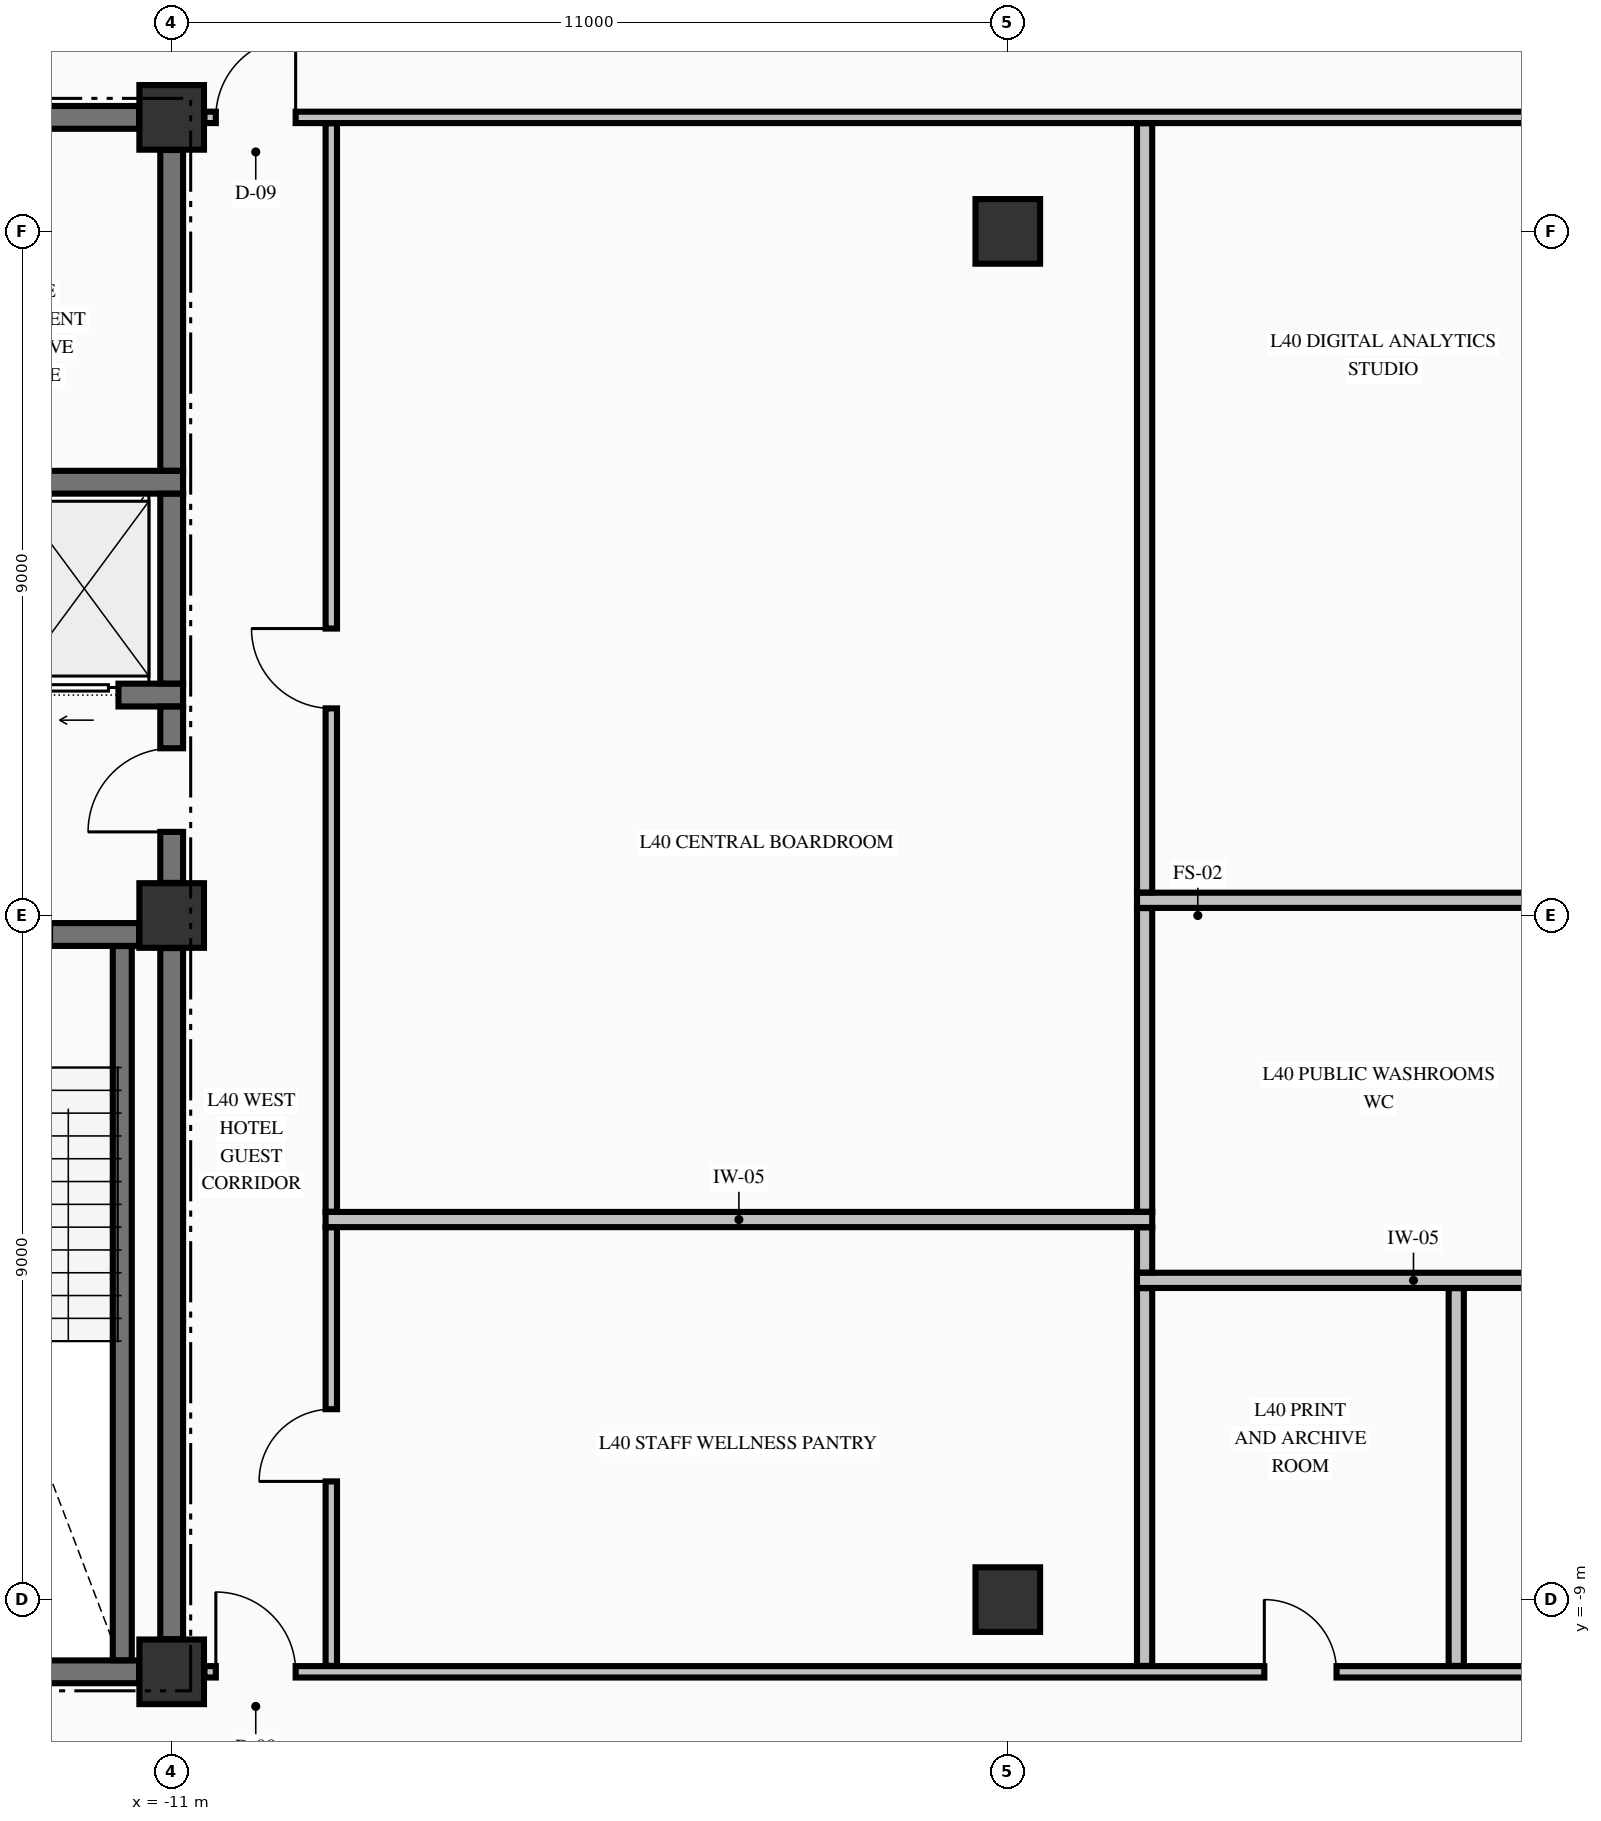
"""IFC4 building model, lengths in metres.
Left out: names, types, materials, properties, quantities, classifications, styles, units other than length and angle.
Written with IfcOpenShell. Run it as: python <this file> out.ifc"""

import sys

from ifc_helpers import new_model, si_unit, direction, frame, frame_2d, origin, origin_2d, place, context, subcontext, project, spatial, rectangle, extrude, element, fill, save


model = new_model("IFC4")
c1 = context("Model", 3, precision=1e-05, world=origin(), true_north=direction((0.0, 1.0)))
c2 = subcontext(c1, "Body", "Model", "MODEL_VIEW")
j1 = project(units=[si_unit("LENGTHUNIT", "METRE"), si_unit("PLANEANGLEUNIT", "RADIAN")], contexts=[c1])
p1 = place(None, origin())
s1 = spatial("IfcSite", under=j1, at=p1, CompositionType="ELEMENT")
p2 = place(p1, origin())
s2 = spatial("IfcBuilding", under=s1, at=p2, CompositionType="ELEMENT")
p3 = place(p2, frame((0.0, 0.0, 158.24)))
s3 = spatial("IfcBuildingStorey", under=s2, at=p3, CompositionType="ELEMENT", Elevation=158.24)
for number, where, z_axis, x_axis in (
    (1, (-11.0, -9.95, -0.425), (0.0, 0.0, 1.0), (1.0, 0.0, 0.0)),
    (2, (-11.0, 0.0, -0.425), (0.0, 0.0, 1.0), (1.0, 0.0, 0.0)),
    (3, (-11.0, 10.5, -0.425), (0.0, 0.0, 1.0), (1.0, 0.0, 0.0)),
    (4, (0.0, -9.0, -0.425), (0.0, 0.0, 1.0), (1.0, 0.0, 0.0)),
    (5, (0.0, 9.0, -0.425), (0.0, 0.0, 1.0), (1.0, 0.0, 0.0)),
):
    element("IfcColumn", number, at=place(p3, frame(where, z_axis=z_axis, x_axis=x_axis)), inside=s3, PredefinedType="COLUMN", context=c2, shape_type="SweptSolid", body=[
        extrude(rectangle(XDim=0.85, YDim=0.85, at=origin_2d()), origin(), (0.0, 0.0, 1.0), 4.595),
    ])
p4 = place(p3, frame((-14.7, -9.95, 0.0), z_axis=(0.0, 0.0, 1.0), x_axis=(1.0, 0.0, 0.0)))
e6 = element("IfcWall", 6, at=p4, inside=s3, PredefinedType="SHEAR", context=c2, shape_type="SweptSolid", body=[
    extrude(rectangle(XDim=3.271, YDim=0.3, at=frame_2d((1.635, 0.0))), origin(), (0.0, 0.0, 1.0), 4.17),
])
p5 = place(p3, frame((-19.571, -0.25, 0.0), z_axis=(0.0, 0.0, 1.0), x_axis=(1.0, 0.0, 0.0)))
e7 = element("IfcWall", 7, at=p5, inside=s3, PredefinedType="SHEAR", context=c2, shape_type="SweptSolid", body=[
    extrude(rectangle(XDim=8.142, YDim=0.3, at=frame_2d((4.071, 0.0))), origin(), (0.0, 0.0, 1.0), 4.17),
])
p6 = place(p5, frame((5.871, 0.0, 0.0)))
e8 = element("IfcOpeningElement", 8, at=p6, cuts=e7, PredefinedType="OPENING", context=c2, shape_type="SweptSolid", body=[
    extrude(rectangle(XDim=1.1, YDim=2.15, at=frame_2d((0.55, 1.075))), frame((0.0, 0.16, 0.0), z_axis=(0.0, -1.0, 0.0), x_axis=(1.0, 0.0, 0.0)), (0.0, 0.0, 1.0), 0.32),
])
p7 = place(p3, frame((-14.875, 2.9, 0.0), z_axis=(0.0, 0.0, 1.0), x_axis=(1.0, 0.0, 0.0)))
e9 = element("IfcWall", 9, at=p7, inside=s3, PredefinedType="SHEAR", context=c2, shape_type="SweptSolid", body=[
    extrude(rectangle(XDim=4.025, YDim=0.3, at=frame_2d((2.012, 0.0))), origin(), (0.0, 0.0, 1.0), 4.17),
])
p8 = place(p7, frame((2.075, 0.0, 0.0)))
e10 = element("IfcOpeningElement", 10, at=p8, cuts=e9, PredefinedType="OPENING", context=c2, shape_type="SweptSolid", body=[
    extrude(rectangle(XDim=1.1, YDim=2.2, at=frame_2d((0.55, 1.1))), frame((0.0, 0.16, 0.0), z_axis=(0.0, -1.0, 0.0), x_axis=(1.0, 0.0, 0.0)), (0.0, 0.0, 1.0), 0.32),
])
p9 = place(p3, frame((-14.875, 5.7, 0.0), z_axis=(0.0, 0.0, 1.0), x_axis=(1.0, 0.0, 0.0)))
e11 = element("IfcWall", 11, at=p9, inside=s3, PredefinedType="SHEAR", context=c2, shape_type="SweptSolid", body=[
    extrude(rectangle(XDim=4.025, YDim=0.3, at=frame_2d((2.012, 0.0))), origin(), (0.0, 0.0, 1.0), 4.17),
])
p10 = place(p3, frame((-14.7, 10.5, 0.0), z_axis=(0.0, 0.0, 1.0), x_axis=(1.0, 0.0, 0.0)))
e12 = element("IfcWall", 12, at=p10, inside=s3, PredefinedType="SHEAR", context=c2, shape_type="SweptSolid", body=[
    extrude(rectangle(XDim=3.271, YDim=0.3, at=frame_2d((1.635, 0.0))), origin(), (0.0, 0.0, 1.0), 4.17),
])
p11 = place(p10, frame((0.775, 0.0, 0.0)))
e13 = element("IfcOpeningElement", 13, at=p11, cuts=e12, PredefinedType="OPENING", context=c2, shape_type="SweptSolid", body=[
    extrude(rectangle(XDim=0.95, YDim=2.15, at=frame_2d((0.475, 1.075))), frame((0.0, 0.16, 0.0), z_axis=(0.0, -1.0, 0.0), x_axis=(1.0, 0.0, 0.0)), (0.0, 0.0, 1.0), 0.32),
])
p12 = place(p3, frame((-10.569, -9.95, 0.0), z_axis=(0.0, 0.0, 1.0), x_axis=(1.0, 0.0, 0.0)))
e14 = element("IfcWall", 14, at=p12, inside=s3, PredefinedType="PARTITIONING", context=c2, shape_type="SweptSolid", body=[
    extrude(rectangle(XDim=21.138, YDim=0.15, at=frame_2d((10.569, 0.0))), origin(), (0.0, 0.0, 1.0), 4.17),
])
p13 = place(p12, frame((0.15, 0.0, 0.0)))
e15 = element("IfcOpeningElement", 15, at=p13, cuts=e14, PredefinedType="OPENING", context=c2, shape_type="SweptSolid", body=[
    extrude(rectangle(XDim=1.05, YDim=2.15, at=frame_2d((0.525, 1.075))), frame((0.0, 0.085, 0.0), z_axis=(0.0, -1.0, 0.0), x_axis=(1.0, 0.0, 0.0)), (0.0, 0.0, 1.0), 0.17),
])
p14 = place(p12, frame((19.938, 0.0, 0.0)))
e16 = element("IfcOpeningElement", 16, at=p14, cuts=e14, PredefinedType="OPENING", context=c2, shape_type="SweptSolid", body=[
    extrude(rectangle(XDim=1.05, YDim=2.15, at=frame_2d((0.525, 1.075))), frame((0.0, 0.085, 0.0), z_axis=(0.0, -1.0, 0.0), x_axis=(1.0, 0.0, 0.0)), (0.0, 0.0, 1.0), 0.17),
])
p15 = place(p12, frame((13.944, 0.0, 0.0)))
e17 = element("IfcOpeningElement", 17, at=p15, cuts=e14, PredefinedType="OPENING", context=c2, shape_type="SweptSolid", body=[
    extrude(rectangle(XDim=0.95, YDim=2.15, at=frame_2d((0.475, 1.075))), frame((0.0, 0.085, 0.0), z_axis=(0.0, -1.0, 0.0), x_axis=(1.0, 0.0, 0.0)), (0.0, 0.0, 1.0), 0.17),
])
p16 = place(p3, frame((1.7, -4.8, 0.0), z_axis=(0.0, 0.0, 1.0), x_axis=(1.0, 0.0, 0.0)))
e18 = element("IfcWall", 18, at=p16, inside=s3, PredefinedType="PARTITIONING", context=c2, shape_type="SweptSolid", body=[
    extrude(rectangle(XDim=7.275, YDim=0.2, at=frame_2d((3.638, 0.0))), origin(), (0.0, 0.0, 1.0), 4.17),
])
p17 = place(p3, frame((-8.975, -4.0, 0.0), z_axis=(0.0, 0.0, 1.0), x_axis=(1.0, 0.0, 0.0)))
e19 = element("IfcWall", 19, at=p17, inside=s3, PredefinedType="PARTITIONING", context=c2, shape_type="SweptSolid", body=[
    extrude(rectangle(XDim=10.875, YDim=0.2, at=frame_2d((5.438, 0.0))), origin(), (0.0, 0.0, 1.0), 4.17),
])
p18 = place(p3, frame((1.7, 0.2, 0.0), z_axis=(0.0, 0.0, 1.0), x_axis=(1.0, 0.0, 0.0)))
e20 = element("IfcWall", 20, at=p18, inside=s3, PredefinedType="PARTITIONING", context=c2, shape_type="SweptSolid", body=[
    extrude(rectangle(XDim=7.275, YDim=0.2, at=frame_2d((3.638, 0.0))), origin(), (0.0, 0.0, 1.0), 4.17),
])
p19 = place(p3, frame((-10.569, 10.5, 0.0), z_axis=(0.0, 0.0, 1.0), x_axis=(1.0, 0.0, 0.0)))
e21 = element("IfcWall", 21, at=p19, inside=s3, PredefinedType="PARTITIONING", context=c2, shape_type="SweptSolid", body=[
    extrude(rectangle(XDim=21.138, YDim=0.15, at=frame_2d((10.569, 0.0))), origin(), (0.0, 0.0, 1.0), 4.17),
])
p20 = place(p19, frame((0.15, 0.0, 0.0)))
e22 = element("IfcOpeningElement", 22, at=p20, cuts=e21, PredefinedType="OPENING", context=c2, shape_type="SweptSolid", body=[
    extrude(rectangle(XDim=1.05, YDim=2.15, at=frame_2d((0.525, 1.075))), frame((0.0, 0.085, 0.0), z_axis=(0.0, -1.0, 0.0), x_axis=(1.0, 0.0, 0.0)), (0.0, 0.0, 1.0), 0.17),
])
p21 = place(p19, frame((19.938, 0.0, 0.0)))
e23 = element("IfcOpeningElement", 23, at=p21, cuts=e21, PredefinedType="OPENING", context=c2, shape_type="SweptSolid", body=[
    extrude(rectangle(XDim=1.05, YDim=2.15, at=frame_2d((0.525, 1.075))), frame((0.0, 0.085, 0.0), z_axis=(0.0, -1.0, 0.0), x_axis=(1.0, 0.0, 0.0)), (0.0, 0.0, 1.0), 0.17),
])
p22 = place(p3, frame((-11.65, -9.798, 0.0), z_axis=(0.0, 0.0, 1.0), x_axis=(0.0, 1.0, 0.0)))
e24 = element("IfcWall", 24, at=p22, inside=s3, PredefinedType="SOLIDWALL", context=c2, shape_type="SweptSolid", body=[
    extrude(rectangle(XDim=9.396, YDim=0.25, at=frame_2d((4.698, 0.0))), origin(), (0.0, 0.0, 1.0), 4.17),
])
p23 = place(p3, frame((-11.0, -9.521, 0.0), z_axis=(0.0, 0.0, 1.0), x_axis=(0.0, 1.0, 0.0)))
e25 = element("IfcWall", 25, at=p23, inside=s3, PredefinedType="SHEAR", context=c2, shape_type="SweptSolid", body=[
    extrude(rectangle(XDim=9.092, YDim=0.3, at=frame_2d((4.546, 0.0))), origin(), (0.0, 0.0, 1.0), 4.17),
])
p24 = place(p3, frame((-11.0, 0.429, 0.0), z_axis=(0.0, 0.0, 1.0), x_axis=(0.0, 1.0, 0.0)))
e26 = element("IfcWall", 26, at=p24, inside=s3, PredefinedType="SHEAR", context=c2, shape_type="SweptSolid", body=[
    extrude(rectangle(XDim=2.319, YDim=0.3, at=frame_2d((1.16, 0.0))), origin(), (0.0, 0.0, 1.0), 4.17),
])
p25 = place(p24, frame((0.671, 0.0, 0.0)))
e27 = element("IfcOpeningElement", 27, at=p25, cuts=e26, PredefinedType="OPENING", context=c2, shape_type="SweptSolid", body=[
    extrude(rectangle(XDim=1.1, YDim=2.15, at=frame_2d((0.55, 1.075))), frame((0.0, 0.16, 0.0), z_axis=(0.0, -1.0, 0.0), x_axis=(1.0, 0.0, 0.0)), (0.0, 0.0, 1.0), 0.32),
])
p26 = place(p3, frame((-11.0, 3.052, 0.0), z_axis=(0.0, 0.0, 1.0), x_axis=(0.0, 1.0, 0.0)))
e28 = element("IfcWall", 28, at=p26, inside=s3, PredefinedType="SHEAR", context=c2, shape_type="SweptSolid", body=[
    extrude(rectangle(XDim=2.496, YDim=0.3, at=frame_2d((1.248, 0.0))), origin(), (0.0, 0.0, 1.0), 4.17),
])
p27 = place(p3, frame((-11.0, 5.852, 0.0), z_axis=(0.0, 0.0, 1.0), x_axis=(0.0, 1.0, 0.0)))
e29 = element("IfcWall", 29, at=p27, inside=s3, PredefinedType="SHEAR", context=c2, shape_type="SweptSolid", body=[
    extrude(rectangle(XDim=4.219, YDim=0.3, at=frame_2d((2.109, 0.0))), origin(), (0.0, 0.0, 1.0), 4.17),
])
p28 = place(p3, frame((-8.9, -9.872, 0.0), z_axis=(0.0, 0.0, 1.0), x_axis=(0.0, 1.0, 0.0)))
e30 = element("IfcWall", 30, at=p28, inside=s3, PredefinedType="PARTITIONING", context=c2, shape_type="SweptSolid", body=[
    extrude(rectangle(XDim=5.769, YDim=0.15, at=frame_2d((2.885, 0.0))), origin(), (0.0, 0.0, 1.0), 4.17),
])
p29 = place(p28, frame((2.427, 0.0, 0.0)))
e31 = element("IfcOpeningElement", 31, at=p29, cuts=e30, PredefinedType="OPENING", context=c2, shape_type="SweptSolid", body=[
    extrude(rectangle(XDim=0.95, YDim=2.15, at=frame_2d((0.475, 1.075))), frame((0.0, 0.085, 0.0), z_axis=(0.0, -1.0, 0.0), x_axis=(1.0, 0.0, 0.0)), (0.0, 0.0, 1.0), 0.17),
])
p30 = place(p3, frame((-8.9, -3.897, 0.0), z_axis=(0.0, 0.0, 1.0), x_axis=(0.0, 1.0, 0.0)))
e32 = element("IfcWall", 32, at=p30, inside=s3, PredefinedType="PARTITIONING", context=c2, shape_type="SweptSolid", body=[
    extrude(rectangle(XDim=14.319, YDim=0.15, at=frame_2d((7.16, 0.0))), origin(), (0.0, 0.0, 1.0), 4.17),
])
p31 = place(p30, frame((6.622, 0.0, 0.0)))
e33 = element("IfcOpeningElement", 33, at=p31, cuts=e32, PredefinedType="OPENING", context=c2, shape_type="SweptSolid", body=[
    extrude(rectangle(XDim=1.05, YDim=2.15, at=frame_2d((0.525, 1.075))), frame((0.0, 0.085, 0.0), z_axis=(0.0, -1.0, 0.0), x_axis=(1.0, 0.0, 0.0)), (0.0, 0.0, 1.0), 0.17),
])
p32 = place(p3, frame((1.8, -9.872, 0.0), z_axis=(0.0, 0.0, 1.0), x_axis=(0.0, 1.0, 0.0)))
e34 = element("IfcWall", 34, at=p32, inside=s3, PredefinedType="PARTITIONING", context=c2, shape_type="SweptSolid", body=[
    extrude(rectangle(XDim=4.969, YDim=0.2, at=frame_2d((2.484, 0.0))), origin(), (0.0, 0.0, 1.0), 4.17),
])
p33 = place(p3, frame((1.8, -4.697, 0.0), z_axis=(0.0, 0.0, 1.0), x_axis=(0.0, 1.0, 0.0)))
e35 = element("IfcWall", 35, at=p33, inside=s3, PredefinedType="PARTITIONING", context=c2, shape_type="SweptSolid", body=[
    extrude(rectangle(XDim=0.594, YDim=0.2, at=frame_2d((0.297, 0.0))), origin(), (0.0, 0.0, 1.0), 4.17),
])
p34 = place(p3, frame((1.8, -3.897, 0.0), z_axis=(0.0, 0.0, 1.0), x_axis=(0.0, 1.0, 0.0)))
e36 = element("IfcWall", 36, at=p34, inside=s3, PredefinedType="PARTITIONING", context=c2, shape_type="SweptSolid", body=[
    extrude(rectangle(XDim=3.994, YDim=0.2, at=frame_2d((1.997, 0.0))), origin(), (0.0, 0.0, 1.0), 4.17),
])
p35 = place(p3, frame((1.8, 0.303, 0.0), z_axis=(0.0, 0.0, 1.0), x_axis=(0.0, 1.0, 0.0)))
e37 = element("IfcWall", 37, at=p35, inside=s3, PredefinedType="PARTITIONING", context=c2, shape_type="SweptSolid", body=[
    extrude(rectangle(XDim=10.119, YDim=0.2, at=frame_2d((5.06, 0.0))), origin(), (0.0, 0.0, 1.0), 4.17),
])
p36 = place(p3, frame((5.9, -9.872, 0.0), z_axis=(0.0, 0.0, 1.0), x_axis=(0.0, 1.0, 0.0)))
e38 = element("IfcWall", 38, at=p36, inside=s3, PredefinedType="PARTITIONING", context=c2, shape_type="SweptSolid", body=[
    extrude(rectangle(XDim=4.969, YDim=0.2, at=frame_2d((2.484, 0.0))), origin(), (0.0, 0.0, 1.0), 4.17),
])
p37 = place(p25, origin())
e39 = element("IfcDoor", 39, at=p37, inside=s3, OperationType="SINGLE_SWING_LEFT", PredefinedType="DOOR", context=c2, shape_type="SweptSolid", body=[
    extrude(rectangle(XDim=1.1, YDim=2.15, at=frame_2d((0.55, 1.075))), frame((0.0, 0.025, 0.0), z_axis=(0.0, -1.0, 0.0), x_axis=(1.0, 0.0, 0.0)), (0.0, 0.0, 1.0), 0.05),
])
fill(e27, e39)
p38 = place(p8, origin())
e40 = element("IfcDoor", 40, at=p38, inside=s3, OperationType="SLIDING_TO_LEFT", PredefinedType="DOOR", context=c2, shape_type="SweptSolid", body=[
    extrude(rectangle(XDim=1.1, YDim=2.2, at=frame_2d((0.55, 1.1))), frame((0.0, 0.025, 0.0), z_axis=(0.0, -1.0, 0.0), x_axis=(1.0, 0.0, 0.0)), (0.0, 0.0, 1.0), 0.05),
])
fill(e10, e40)
p39 = place(p20, origin())
e41 = element("IfcDoor", 41, at=p39, inside=s3, OperationType="SINGLE_SWING_RIGHT", PredefinedType="DOOR", context=c2, shape_type="SweptSolid", body=[
    extrude(rectangle(XDim=1.05, YDim=2.15, at=frame_2d((0.525, 1.075))), frame((0.0, 0.025, 0.0), z_axis=(0.0, -1.0, 0.0), x_axis=(1.0, 0.0, 0.0)), (0.0, 0.0, 1.0), 0.05),
])
fill(e22, e41)
p40 = place(p13, origin())
e42 = element("IfcDoor", 42, at=p40, inside=s3, OperationType="SINGLE_SWING_LEFT", PredefinedType="DOOR", context=c2, shape_type="SweptSolid", body=[
    extrude(rectangle(XDim=1.05, YDim=2.15, at=frame_2d((0.525, 1.075))), frame((0.0, 0.025, 0.0), z_axis=(0.0, -1.0, 0.0), x_axis=(1.0, 0.0, 0.0)), (0.0, 0.0, 1.0), 0.05),
])
fill(e15, e42)
p41 = place(p31, origin())
e43 = element("IfcDoor", 43, at=p41, inside=s3, OperationType="SINGLE_SWING_RIGHT", PredefinedType="DOOR", context=c2, shape_type="SweptSolid", body=[
    extrude(rectangle(XDim=1.05, YDim=2.15, at=frame_2d((0.525, 1.075))), frame((0.0, 0.025, 0.0), z_axis=(0.0, -1.0, 0.0), x_axis=(1.0, 0.0, 0.0)), (0.0, 0.0, 1.0), 0.05),
])
fill(e33, e43)
p42 = place(p29, origin())
e44 = element("IfcDoor", 44, at=p42, inside=s3, OperationType="SINGLE_SWING_LEFT", PredefinedType="DOOR", context=c2, shape_type="SweptSolid", body=[
    extrude(rectangle(XDim=0.95, YDim=2.15, at=frame_2d((0.475, 1.075))), frame((0.0, 0.025, 0.0), z_axis=(0.0, -1.0, 0.0), x_axis=(1.0, 0.0, 0.0)), (0.0, 0.0, 1.0), 0.05),
])
fill(e31, e44)
p43 = place(p15, origin())
e45 = element("IfcDoor", 45, at=p43, inside=s3, OperationType="SINGLE_SWING_LEFT", PredefinedType="DOOR", context=c2, shape_type="SweptSolid", body=[
    extrude(rectangle(XDim=0.95, YDim=2.15, at=frame_2d((0.475, 1.075))), frame((0.0, 0.025, 0.0), z_axis=(0.0, -1.0, 0.0), x_axis=(1.0, 0.0, 0.0)), (0.0, 0.0, 1.0), 0.05),
])
fill(e17, e45)
save(model, sys.argv[1])
